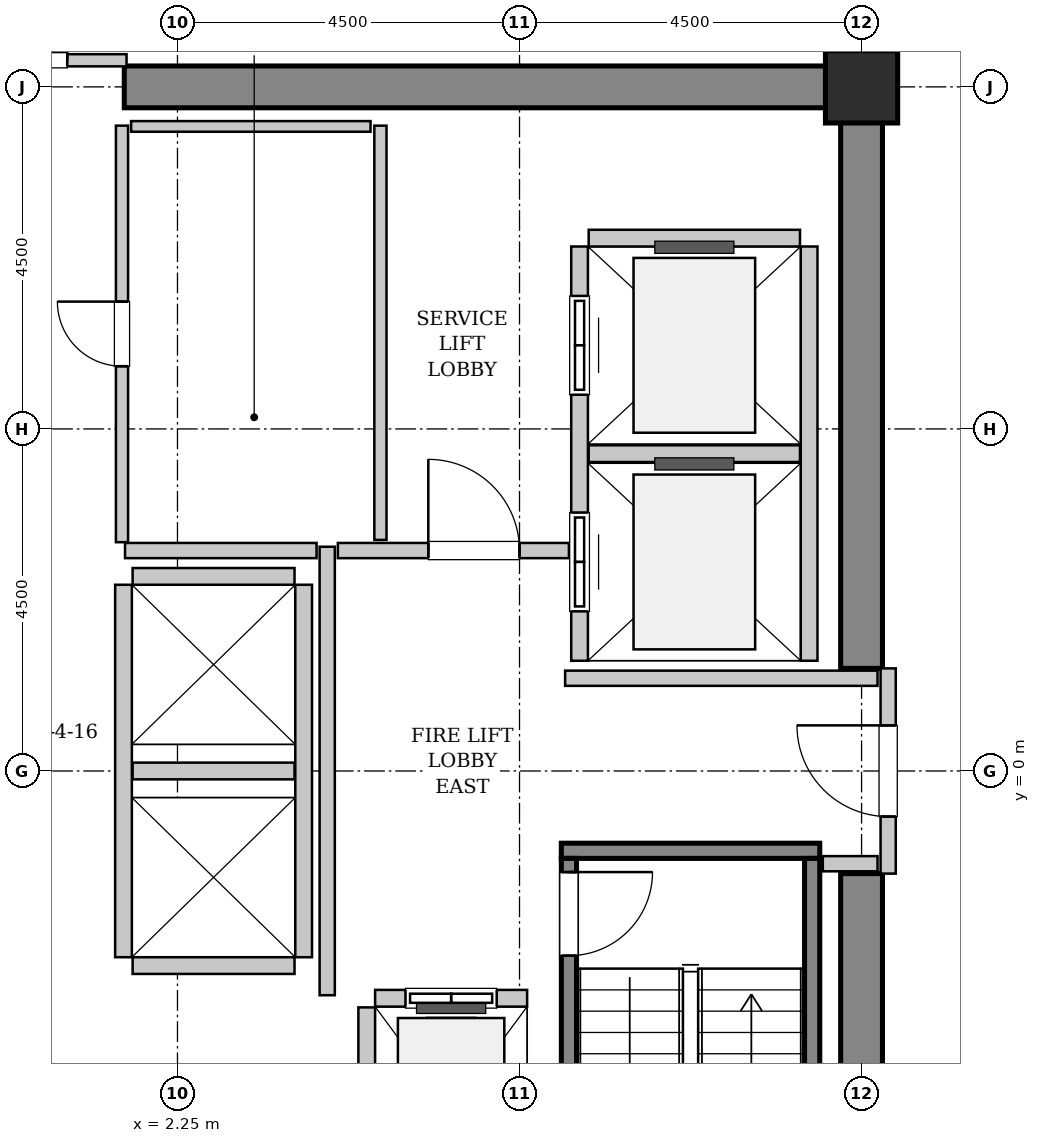
"""IFC4 building model, lengths in metres.
Left out: names, types, materials, properties, quantities, classifications, styles, units other than length and angle.
Written with IfcOpenShell. Run it as: python <this file> out.ifc"""

import sys

from ifc_helpers import new_model, si_unit, direction, frame, frame_2d, origin, origin_2d, place, context, subcontext, project, spatial, rectangle, hollow_rectangle, extrude, source, transform, mapped, element, fill, save


model = new_model("IFC4")
c1 = context("Model", 3, precision=1e-05, world=origin(), true_north=direction((0.0, 1.0)))
c2 = subcontext(c1, "Body", "Model", "MODEL_VIEW")
j1 = project(units=[si_unit("LENGTHUNIT", "METRE"), si_unit("PLANEANGLEUNIT", "RADIAN")], contexts=[c1])
p1 = place(None, origin())
s1 = spatial("IfcSite", under=j1, at=p1, CompositionType="ELEMENT")
p2 = place(p1, origin())
s2 = spatial("IfcBuilding", under=s1, at=p2, CompositionType="ELEMENT")
p3 = place(p2, frame((0.0, 0.0, 179.2)))
s3 = spatial("IfcBuildingStorey", under=s2, at=p3, CompositionType="ELEMENT", Elevation=179.2)
m1 = source(origin(), c2, "Body", "SweptSolid", [
    extrude(rectangle(XDim=9.975, YDim=0.55, at=frame_2d((4.987, 0.0))), origin(), (0.0, 0.0, 1.0), 3.8),
])
p4 = place(p3, frame((1.55, 9.0, 0.0), z_axis=(0.0, 0.0, 1.0), x_axis=(1.0, 0.0, 0.0)))
e1 = element("IfcWall", 1, at=p4, inside=s3, PredefinedType="SHEAR", context=c2, shape_type="MappedRepresentation", body=[
    mapped(m1, transform((0.0, 0.0, 0.0), x_axis=(1.0, 0.0, 0.0), y_axis=(0.0, 1.0, 0.0), z_axis=(0.0, 0.0, 1.0), scale=1.0)),
])
m2 = source(origin(), c2, "Body", "SweptSolid", [
    extrude(rectangle(XDim=7.375, YDim=0.55, at=frame_2d((3.688, 0.0))), origin(), (0.0, 0.0, 1.0), 3.8),
])
for number, where, z_axis, x_axis in (
    (2, (11.25, -8.725, 0.0), (0.0, 0.0, 1.0), (0.0, 1.0, 0.0)),
    (3, (11.25, 1.35, 0.0), (0.0, 0.0, 1.0), (0.0, 1.0, 0.0)),
):
    element("IfcWall", number, at=place(p3, frame(where, z_axis=z_axis, x_axis=x_axis)), inside=s3, PredefinedType="SHEAR", context=c2, shape_type="MappedRepresentation", body=[
        mapped(m2, transform((0.0, 0.0, 0.0), x_axis=(1.0, 0.0, 0.0), y_axis=(0.0, 1.0, 0.0), z_axis=(0.0, 0.0, 1.0), scale=1.0)),
    ])
m3 = source(origin(), c2, "Body", "SweptSolid", [
    extrude(hollow_rectangle(XDim=0.95, YDim=0.95, WallThickness=0.045, InnerFilletRadius=0.045, OuterFilletRadius=0.09, at=origin_2d()), origin(), (0.0, 0.0, 1.0), 3.8),
])
p5 = place(p3, frame((11.25, 9.0, 0.0), z_axis=(0.0, 0.0, 1.0), x_axis=(1.0, 0.0, 0.0)))
e4 = element("IfcColumn", 4, at=p5, inside=s3, PredefinedType="COLUMN", context=c2, shape_type="MappedRepresentation", body=[
    mapped(m3, transform((0.0, 0.0, 0.0), x_axis=(1.0, 0.0, 0.0), y_axis=(0.0, 1.0, 0.0), z_axis=(0.0, 0.0, 1.0), scale=1.0)),
])
m4 = source(origin(), c2, "Body", "SweptSolid", [
    extrude(rectangle(XDim=3.4, YDim=0.2, at=frame_2d((1.7, 0.0))), origin(), (0.0, 0.0, 1.0), 3.8),
])
p6 = place(p3, frame((7.3, -1.05, 0.0), z_axis=(0.0, 0.0, 1.0), x_axis=(1.0, 0.0, 0.0)))
e5 = element("IfcWall", 5, at=p6, inside=s3, PredefinedType="SOLIDWALL", context=c2, shape_type="MappedRepresentation", body=[
    mapped(m4, transform((0.0, 0.0, 0.0), x_axis=(1.0, 0.0, 0.0), y_axis=(0.0, 1.0, 0.0), z_axis=(0.0, 0.0, 1.0), scale=1.0)),
])
m5 = source(origin(), c2, "Body", "SweptSolid", [
    extrude(rectangle(XDim=7.1, YDim=0.2, at=frame_2d((3.55, 0.0))), origin(), (0.0, 0.0, 1.0), 3.8),
])
p7 = place(p3, frame((7.4, -1.15, 0.0), z_axis=(0.0, 0.0, 1.0), x_axis=(0.0, -1.0, 0.0)))
e6 = element("IfcWall", 6, at=p7, inside=s3, PredefinedType="SOLIDWALL", context=c2, shape_type="MappedRepresentation", body=[
    mapped(m5, transform((0.0, 0.0, 0.0), x_axis=(1.0, 0.0, 0.0), y_axis=(0.0, 1.0, 0.0), z_axis=(0.0, 0.0, 1.0), scale=1.0)),
])
p8 = place(p7, frame((0.18, 0.0, 0.0)))
e7 = element("IfcOpeningElement", 7, at=p8, cuts=e6, PredefinedType="OPENING", context=c2, shape_type="SweptSolid", body=[
    extrude(rectangle(XDim=1.1, YDim=2.15, at=frame_2d((0.55, 1.075))), frame((0.0, 0.11, 0.0), z_axis=(0.0, -1.0, 0.0), x_axis=(1.0, 0.0, 0.0)), (0.0, 0.0, 1.0), 0.22),
])
p9 = place(p3, frame((10.6, -1.15, 0.0), z_axis=(0.0, 0.0, 1.0), x_axis=(0.0, -1.0, 0.0)))
e8 = element("IfcWall", 8, at=p9, inside=s3, PredefinedType="SOLIDWALL", context=c2, shape_type="MappedRepresentation", body=[
    mapped(m5, transform((0.0, 0.0, 0.0), x_axis=(1.0, 0.0, 0.0), y_axis=(0.0, 1.0, 0.0), z_axis=(0.0, 0.0, 1.0), scale=1.0)),
])
m6 = source(origin(), c2, "Body", "SweptSolid", [
    extrude(rectangle(XDim=2.0, YDim=0.22, at=frame_2d((1.0, 0.0))), origin(), (0.0, 0.0, 1.0), 3.535),
])
p10 = place(p3, frame((6.85, -2.99, 0.0), z_axis=(0.0, 0.0, 1.0), x_axis=(-1.0, 0.0, 0.0)))
e9 = element("IfcWall", 9, at=p10, inside=s3, PredefinedType="SOLIDWALL", context=c2, shape_type="MappedRepresentation", body=[
    mapped(m6, transform((0.0, 0.0, 0.0), x_axis=(1.0, 0.0, 0.0), y_axis=(0.0, 1.0, 0.0), z_axis=(0.0, 0.0, 1.0), scale=1.0)),
])
p11 = place(p10, frame((0.4, 0.0, 0.0)))
e10 = element("IfcOpeningElement", 10, at=p11, cuts=e9, PredefinedType="OPENING", context=c2, shape_type="SweptSolid", body=[
    extrude(rectangle(XDim=1.2, YDim=2.2, at=frame_2d((0.6, 1.1))), frame((0.0, 0.12, 0.0), z_axis=(0.0, -1.0, 0.0), x_axis=(1.0, 0.0, 0.0)), (0.0, 0.0, 1.0), 0.24),
])
m7 = source(origin(), c2, "Body", "SweptSolid", [
    extrude(rectangle(XDim=2.68, YDim=0.22, at=frame_2d((1.34, 0.0))), origin(), (0.0, 0.0, 1.0), 3.535),
])
p12 = place(p3, frame((4.74, -3.11, 0.0), z_axis=(0.0, 0.0, 1.0), x_axis=(0.0, -1.0, 0.0)))
e11 = element("IfcWall", 11, at=p12, inside=s3, PredefinedType="SOLIDWALL", context=c2, shape_type="MappedRepresentation", body=[
    mapped(m7, transform((0.0, 0.0, 0.0), x_axis=(1.0, 0.0, 0.0), y_axis=(0.0, 1.0, 0.0), z_axis=(0.0, 0.0, 1.0), scale=1.0)),
])
m8 = source(origin(), c2, "Body", "SweptSolid", [
    extrude(rectangle(XDim=5.45, YDim=0.22, at=frame_2d((2.725, 0.0))), origin(), (0.0, 0.0, 1.0), 3.535),
])
p13 = place(p3, frame((7.54, 6.9, 0.0), z_axis=(0.0, 0.0, 1.0), x_axis=(0.0, -1.0, 0.0)))
e12 = element("IfcWall", 12, at=p13, inside=s3, PredefinedType="SOLIDWALL", context=c2, shape_type="MappedRepresentation", body=[
    mapped(m8, transform((0.0, 0.0, 0.0), x_axis=(1.0, 0.0, 0.0), y_axis=(0.0, 1.0, 0.0), z_axis=(0.0, 0.0, 1.0), scale=1.0)),
])
p14 = place(p13, frame((3.5, 0.0, 0.0)))
e13 = element("IfcOpeningElement", 13, at=p14, cuts=e12, PredefinedType="OPENING", context=c2, shape_type="SweptSolid", body=[
    extrude(rectangle(XDim=1.3, YDim=2.3, at=frame_2d((0.65, 1.15))), frame((0.0, 0.12, 0.0), z_axis=(0.0, -1.0, 0.0), x_axis=(1.0, 0.0, 0.0)), (0.0, 0.0, 1.0), 0.24),
])
p15 = place(p13, frame((0.65, 0.0, 0.0)))
e14 = element("IfcOpeningElement", 14, at=p15, cuts=e12, PredefinedType="OPENING", context=c2, shape_type="SweptSolid", body=[
    extrude(rectangle(XDim=1.3, YDim=2.3, at=frame_2d((0.65, 1.15))), frame((0.0, 0.12, 0.0), z_axis=(0.0, -1.0, 0.0), x_axis=(1.0, 0.0, 0.0)), (0.0, 0.0, 1.0), 0.24),
])
p16 = place(p3, frame((10.56, 1.45, 0.0), z_axis=(0.0, 0.0, 1.0), x_axis=(0.0, 1.0, 0.0)))
e15 = element("IfcWall", 15, at=p16, inside=s3, PredefinedType="SOLIDWALL", context=c2, shape_type="MappedRepresentation", body=[
    mapped(m8, transform((0.0, 0.0, 0.0), x_axis=(1.0, 0.0, 0.0), y_axis=(0.0, 1.0, 0.0), z_axis=(0.0, 0.0, 1.0), scale=1.0)),
])
m9 = source(origin(), c2, "Body", "SweptSolid", [
    extrude(rectangle(XDim=2.78, YDim=0.22, at=frame_2d((1.39, 0.0))), origin(), (0.0, 0.0, 1.0), 3.535),
])
for number, where, z_axis, x_axis in (
    (16, (7.66, 4.175, 0.0), (0.0, 0.0, 1.0), (1.0, 0.0, 0.0)),
    (17, (10.44, 7.01, 0.0), (0.0, 0.0, 1.0), (-1.0, 0.0, 0.0)),
):
    element("IfcWall", number, at=place(p3, frame(where, z_axis=z_axis, x_axis=x_axis)), inside=s3, PredefinedType="SOLIDWALL", context=c2, shape_type="MappedRepresentation", body=[
        mapped(m9, transform((0.0, 0.0, 0.0), x_axis=(1.0, 0.0, 0.0), y_axis=(0.0, 1.0, 0.0), z_axis=(0.0, 0.0, 1.0), scale=1.0)),
    ])
m10 = source(origin(), c2, "Body", "SweptSolid", [
    extrude(rectangle(XDim=4.9, YDim=0.22, at=frame_2d((2.45, 0.0))), origin(), (0.0, 0.0, 1.0), 3.535),
])
for number, where, z_axis, x_axis in (
    (18, (1.54, 2.45, 0.0), (0.0, 0.0, 1.0), (0.0, -1.0, 0.0)),
    (19, (3.91, -2.45, 0.0), (0.0, 0.0, 1.0), (0.0, 1.0, 0.0)),
):
    element("IfcWall", number, at=place(p3, frame(where, z_axis=z_axis, x_axis=x_axis)), inside=s3, PredefinedType="SOLIDWALL", context=c2, shape_type="MappedRepresentation", body=[
        mapped(m10, transform((0.0, 0.0, 0.0), x_axis=(1.0, 0.0, 0.0), y_axis=(0.0, 1.0, 0.0), z_axis=(0.0, 0.0, 1.0), scale=1.0)),
    ])
m11 = source(origin(), c2, "Body", "SweptSolid", [
    extrude(rectangle(XDim=2.13, YDim=0.22, at=frame_2d((1.065, 0.0))), origin(), (0.0, 0.0, 1.0), 3.535),
])
for number, where, z_axis, x_axis in (
    (20, (1.66, -2.56, 0.0), (0.0, 0.0, 1.0), (1.0, 0.0, 0.0)),
    (21, (1.66, 0.0, 0.0), (0.0, 0.0, 1.0), (1.0, 0.0, 0.0)),
    (22, (3.79, 2.56, 0.0), (0.0, 0.0, 1.0), (-1.0, 0.0, 0.0)),
):
    element("IfcWall", number, at=place(p3, frame(where, z_axis=z_axis, x_axis=x_axis)), inside=s3, PredefinedType="SOLIDWALL", context=c2, shape_type="MappedRepresentation", body=[
        mapped(m11, transform((0.0, 0.0, 0.0), x_axis=(1.0, 0.0, 0.0), y_axis=(0.0, 1.0, 0.0), z_axis=(0.0, 0.0, 1.0), scale=1.0)),
    ])
m12 = source(origin(), c2, "Body", "SweptSolid", [
    extrude(rectangle(XDim=2.7, YDim=0.2, at=frame_2d((1.35, 0.0))), origin(), (0.0, 0.0, 1.0), 2.425),
])
p17 = place(p3, frame((11.6, -1.35, 0.0), z_axis=(0.0, 0.0, 1.0), x_axis=(0.0, 1.0, 0.0)))
e23 = element("IfcWall", 23, at=p17, inside=s3, PredefinedType="PARTITIONING", context=c2, shape_type="MappedRepresentation", body=[
    mapped(m12, transform((0.0, 0.0, 0.0), x_axis=(1.0, 0.0, 0.0), y_axis=(0.0, 1.0, 0.0), z_axis=(0.0, 0.0, 1.0), scale=1.0)),
])
p18 = place(p17, frame((0.75, 0.0, 0.0)))
e24 = element("IfcOpeningElement", 24, at=p18, cuts=e23, PredefinedType="OPENING", context=c2, shape_type="SweptSolid", body=[
    extrude(rectangle(XDim=1.2, YDim=2.15, at=frame_2d((0.6, 1.075))), frame((0.0, 0.11, 0.0), z_axis=(0.0, -1.0, 0.0), x_axis=(1.0, 0.0, 0.0)), (0.0, 0.0, 1.0), 0.22),
])
m13 = source(origin(), c2, "Body", "SweptSolid", [
    extrude(rectangle(XDim=5.9, YDim=0.2, at=frame_2d((2.95, 0.0))), origin(), (0.0, 0.0, 1.0), 3.535),
])
p19 = place(p3, frame((4.22, -2.95, 0.0), z_axis=(0.0, 0.0, 1.0), x_axis=(0.0, 1.0, 0.0)))
e25 = element("IfcWall", 25, at=p19, inside=s3, PredefinedType="PARTITIONING", context=c2, shape_type="MappedRepresentation", body=[
    mapped(m13, transform((0.0, 0.0, 0.0), x_axis=(1.0, 0.0, 0.0), y_axis=(0.0, 1.0, 0.0), z_axis=(0.0, 0.0, 1.0), scale=1.0)),
])
m14 = source(origin(), c2, "Body", "SweptSolid", [
    extrude(rectangle(XDim=2.52, YDim=0.2, at=frame_2d((1.26, 0.0))), origin(), (0.0, 0.0, 1.0), 3.535),
])
p20 = place(p3, frame((1.56, 2.9, 0.0), z_axis=(0.0, 0.0, 1.0), x_axis=(1.0, 0.0, 0.0)))
e26 = element("IfcWall", 26, at=p20, inside=s3, PredefinedType="PARTITIONING", context=c2, shape_type="MappedRepresentation", body=[
    mapped(m14, transform((0.0, 0.0, 0.0), x_axis=(1.0, 0.0, 0.0), y_axis=(0.0, 1.0, 0.0), z_axis=(0.0, 0.0, 1.0), scale=1.0)),
])
m15 = source(origin(), c2, "Body", "SweptSolid", [
    extrude(rectangle(XDim=3.04, YDim=0.2, at=frame_2d((1.52, 0.0))), origin(), (0.0, 0.0, 1.0), 3.535),
])
p21 = place(p3, frame((4.36, 2.9, 0.0), z_axis=(0.0, 0.0, 1.0), x_axis=(1.0, 0.0, 0.0)))
e27 = element("IfcWall", 27, at=p21, inside=s3, PredefinedType="PARTITIONING", context=c2, shape_type="MappedRepresentation", body=[
    mapped(m15, transform((0.0, 0.0, 0.0), x_axis=(1.0, 0.0, 0.0), y_axis=(0.0, 1.0, 0.0), z_axis=(0.0, 0.0, 1.0), scale=1.0)),
])
p22 = place(p21, frame((1.19, 0.0, 0.0)))
e28 = element("IfcOpeningElement", 28, at=p22, cuts=e27, PredefinedType="OPENING", context=c2, shape_type="SweptSolid", body=[
    extrude(rectangle(XDim=1.2, YDim=2.15, at=frame_2d((0.6, 1.075))), frame((0.0, 0.11, 0.0), z_axis=(0.0, -1.0, 0.0), x_axis=(1.0, 0.0, 0.0)), (0.0, 0.0, 1.0), 0.22),
])
m16 = source(origin(), c2, "Body", "SweptSolid", [
    extrude(rectangle(XDim=4.11, YDim=0.2, at=frame_2d((2.055, 0.0))), origin(), (0.0, 0.0, 1.0), 3.535),
])
p23 = place(p3, frame((7.35, 1.22, 0.0), z_axis=(0.0, 0.0, 1.0), x_axis=(1.0, 0.0, 0.0)))
e29 = element("IfcWall", 29, at=p23, inside=s3, PredefinedType="PARTITIONING", context=c2, shape_type="MappedRepresentation", body=[
    mapped(m16, transform((0.0, 0.0, 0.0), x_axis=(1.0, 0.0, 0.0), y_axis=(0.0, 1.0, 0.0), z_axis=(0.0, 0.0, 1.0), scale=1.0)),
])
m17 = source(origin(), c2, "Body", "SweptSolid", [
    extrude(rectangle(XDim=0.72, YDim=0.2, at=frame_2d((0.36, 0.0))), origin(), (0.0, 0.0, 1.0), 3.535),
])
p24 = place(p3, frame((10.74, -1.22, 0.0), z_axis=(0.0, 0.0, 1.0), x_axis=(1.0, 0.0, 0.0)))
e30 = element("IfcWall", 30, at=p24, inside=s3, PredefinedType="PARTITIONING", context=c2, shape_type="MappedRepresentation", body=[
    mapped(m17, transform((0.0, 0.0, 0.0), x_axis=(1.0, 0.0, 0.0), y_axis=(0.0, 1.0, 0.0), z_axis=(0.0, 0.0, 1.0), scale=1.0)),
])
m18 = source(origin(), c2, "Body", "SweptSolid", [
    extrude(rectangle(XDim=3.16, YDim=0.16, at=frame_2d((1.58, 0.0))), origin(), (0.0, 0.0, 1.0), 2.425),
])
p25 = place(p3, frame((-1.58, 9.35, 0.0), z_axis=(0.0, 0.0, 1.0), x_axis=(1.0, 0.0, 0.0)))
e31 = element("IfcWall", 31, at=p25, inside=s3, PredefinedType="PARTITIONING", context=c2, shape_type="MappedRepresentation", body=[
    mapped(m18, transform((0.0, 0.0, 0.0), x_axis=(1.0, 0.0, 0.0), y_axis=(0.0, 1.0, 0.0), z_axis=(0.0, 0.0, 1.0), scale=1.0)),
])
p26 = place(p25, frame((0.78, 0.0, 0.0)))
e32 = element("IfcOpeningElement", 32, at=p26, cuts=e31, PredefinedType="OPENING", context=c2, shape_type="SweptSolid", body=[
    extrude(rectangle(XDim=1.6, YDim=2.3, at=frame_2d((0.8, 1.15))), frame((0.0, 0.09, 0.0), z_axis=(0.0, -1.0, 0.0), x_axis=(1.0, 0.0, 0.0)), (0.0, 0.0, 1.0), 0.18),
])
m19 = source(origin(), c2, "Body", "SweptSolid", [
    extrude(rectangle(XDim=5.45, YDim=0.16, at=frame_2d((2.725, 0.0))), origin(), (0.0, 0.0, 1.0), 3.535),
])
p27 = place(p3, frame((4.92, 3.04, 0.0), z_axis=(0.0, 0.0, 1.0), x_axis=(0.0, 1.0, 0.0)))
e33 = element("IfcWall", 33, at=p27, inside=s3, PredefinedType="PARTITIONING", context=c2, shape_type="MappedRepresentation", body=[
    mapped(m19, transform((0.0, 0.0, 0.0), x_axis=(1.0, 0.0, 0.0), y_axis=(0.0, 1.0, 0.0), z_axis=(0.0, 0.0, 1.0), scale=1.0)),
])
m20 = source(origin(), c2, "Body", "SweptSolid", [
    extrude(rectangle(XDim=5.48, YDim=0.16, at=frame_2d((2.74, 0.0))), origin(), (0.0, 0.0, 1.0), 3.535),
])
p28 = place(p3, frame((1.52, 3.01, 0.0), z_axis=(0.0, 0.0, 1.0), x_axis=(0.0, 1.0, 0.0)))
e34 = element("IfcWall", 34, at=p28, inside=s3, PredefinedType="PARTITIONING", context=c2, shape_type="MappedRepresentation", body=[
    mapped(m20, transform((0.0, 0.0, 0.0), x_axis=(1.0, 0.0, 0.0), y_axis=(0.0, 1.0, 0.0), z_axis=(0.0, 0.0, 1.0), scale=1.0)),
])
p29 = place(p28, frame((2.315, 0.0, 0.0)))
e35 = element("IfcOpeningElement", 35, at=p29, cuts=e34, PredefinedType="OPENING", context=c2, shape_type="SweptSolid", body=[
    extrude(rectangle(XDim=0.85, YDim=2.1, at=frame_2d((0.425, 1.05))), frame((0.0, 0.09, 0.0), z_axis=(0.0, -1.0, 0.0), x_axis=(1.0, 0.0, 0.0)), (0.0, 0.0, 1.0), 0.18),
])
m21 = source(origin(), c2, "Body", "SweptSolid", [
    extrude(rectangle(XDim=3.15, YDim=0.14, at=frame_2d((1.575, 0.0))), origin(), (0.0, 0.0, 1.0), 3.535),
])
p30 = place(p3, frame((1.64, 8.48, 0.0), z_axis=(0.0, 0.0, 1.0), x_axis=(1.0, 0.0, 0.0)))
e36 = element("IfcWall", 36, at=p30, inside=s3, PredefinedType="PARTITIONING", context=c2, shape_type="MappedRepresentation", body=[
    mapped(m21, transform((0.0, 0.0, 0.0), x_axis=(1.0, 0.0, 0.0), y_axis=(0.0, 1.0, 0.0), z_axis=(0.0, 0.0, 1.0), scale=1.0)),
])
m22 = source(origin(), c2, "Body", "SweptSolid", [
    extrude(rectangle(XDim=1.1, YDim=2.15, at=frame_2d((0.55, 1.075))), frame((0.0, 0.025, 0.0), z_axis=(0.0, -1.0, 0.0), x_axis=(1.0, 0.0, 0.0)), (0.0, 0.0, 1.0), 0.05),
])
p31 = place(p8, origin())
e37 = element("IfcDoor", 37, at=p31, inside=s3, OperationType="SINGLE_SWING_LEFT", PredefinedType="DOOR", context=c2, shape_type="MappedRepresentation", body=[
    mapped(m22, transform((0.0, 0.0, 0.0), x_axis=(1.0, 0.0, 0.0), y_axis=(0.0, 1.0, 0.0), z_axis=(0.0, 0.0, 1.0), scale=1.0)),
])
fill(e7, e37)
m23 = source(origin(), c2, "Body", "SweptSolid", [
    extrude(rectangle(XDim=1.2, YDim=2.2, at=frame_2d((0.6, 1.1))), frame((0.0, 0.025, 0.0), z_axis=(0.0, -1.0, 0.0), x_axis=(1.0, 0.0, 0.0)), (0.0, 0.0, 1.0), 0.05),
])
p32 = place(p11, origin())
e38 = element("IfcDoor", 38, at=p32, inside=s3, OperationType="SLIDING_TO_LEFT", PredefinedType="DOOR", context=c2, shape_type="MappedRepresentation", body=[
    mapped(m23, transform((0.0, 0.0, 0.0), x_axis=(1.0, 0.0, 0.0), y_axis=(0.0, 1.0, 0.0), z_axis=(0.0, 0.0, 1.0), scale=1.0)),
])
fill(e10, e38)
m24 = source(origin(), c2, "Body", "SweptSolid", [
    extrude(rectangle(XDim=1.3, YDim=2.3, at=frame_2d((0.65, 1.15))), frame((0.0, 0.025, 0.0), z_axis=(0.0, -1.0, 0.0), x_axis=(1.0, 0.0, 0.0)), (0.0, 0.0, 1.0), 0.05),
])
p33 = place(p14, origin())
e39 = element("IfcDoor", 39, at=p33, inside=s3, OperationType="SLIDING_TO_RIGHT", PredefinedType="DOOR", context=c2, shape_type="MappedRepresentation", body=[
    mapped(m24, transform((0.0, 0.0, 0.0), x_axis=(1.0, 0.0, 0.0), y_axis=(0.0, 1.0, 0.0), z_axis=(0.0, 0.0, 1.0), scale=1.0)),
])
fill(e13, e39)
p34 = place(p15, origin())
e40 = element("IfcDoor", 40, at=p34, inside=s3, OperationType="SLIDING_TO_RIGHT", PredefinedType="DOOR", context=c2, shape_type="MappedRepresentation", body=[
    mapped(m24, transform((0.0, 0.0, 0.0), x_axis=(1.0, 0.0, 0.0), y_axis=(0.0, 1.0, 0.0), z_axis=(0.0, 0.0, 1.0), scale=1.0)),
])
fill(e14, e40)
m25 = source(origin(), c2, "Body", "SweptSolid", [
    extrude(rectangle(XDim=1.2, YDim=2.15, at=frame_2d((0.6, 1.075))), frame((0.0, 0.025, 0.0), z_axis=(0.0, -1.0, 0.0), x_axis=(1.0, 0.0, 0.0)), (0.0, 0.0, 1.0), 0.05),
])
p35 = place(p18, origin())
e41 = element("IfcDoor", 41, at=p35, inside=s3, OperationType="SINGLE_SWING_RIGHT", PredefinedType="DOOR", context=c2, shape_type="MappedRepresentation", body=[
    mapped(m25, transform((0.0, 0.0, 0.0), x_axis=(1.0, 0.0, 0.0), y_axis=(0.0, 1.0, 0.0), z_axis=(0.0, 0.0, 1.0), scale=1.0)),
])
fill(e24, e41)
p36 = place(p22, origin())
e42 = element("IfcDoor", 42, at=p36, inside=s3, OperationType="SINGLE_SWING_LEFT", PredefinedType="DOOR", context=c2, shape_type="MappedRepresentation", body=[
    mapped(m25, transform((0.0, 0.0, 0.0), x_axis=(1.0, 0.0, 0.0), y_axis=(0.0, 1.0, 0.0), z_axis=(0.0, 0.0, 1.0), scale=1.0)),
])
fill(e28, e42)
m26 = source(origin(), c2, "Body", "SweptSolid", [
    extrude(rectangle(XDim=1.6, YDim=2.3, at=frame_2d((0.8, 1.15))), frame((0.0, 0.025, 0.0), z_axis=(0.0, -1.0, 0.0), x_axis=(1.0, 0.0, 0.0)), (0.0, 0.0, 1.0), 0.05),
])
p37 = place(p26, origin())
e43 = element("IfcDoor", 43, at=p37, inside=s3, OperationType="DOUBLE_DOOR_SINGLE_SWING", PredefinedType="DOOR", context=c2, shape_type="MappedRepresentation", body=[
    mapped(m26, transform((0.0, 0.0, 0.0), x_axis=(1.0, 0.0, 0.0), y_axis=(0.0, 1.0, 0.0), z_axis=(0.0, 0.0, 1.0), scale=1.0)),
])
fill(e32, e43)
m27 = source(origin(), c2, "Body", "SweptSolid", [
    extrude(rectangle(XDim=0.85, YDim=2.1, at=frame_2d((0.425, 1.05))), frame((0.0, 0.025, 0.0), z_axis=(0.0, -1.0, 0.0), x_axis=(1.0, 0.0, 0.0)), (0.0, 0.0, 1.0), 0.05),
])
p38 = place(p29, origin())
e44 = element("IfcDoor", 44, at=p38, inside=s3, OperationType="SINGLE_SWING_RIGHT", PredefinedType="DOOR", context=c2, shape_type="MappedRepresentation", body=[
    mapped(m27, transform((0.0, 0.0, 0.0), x_axis=(1.0, 0.0, 0.0), y_axis=(0.0, 1.0, 0.0), z_axis=(0.0, 0.0, 1.0), scale=1.0)),
])
fill(e35, e44)
save(model, sys.argv[1])
